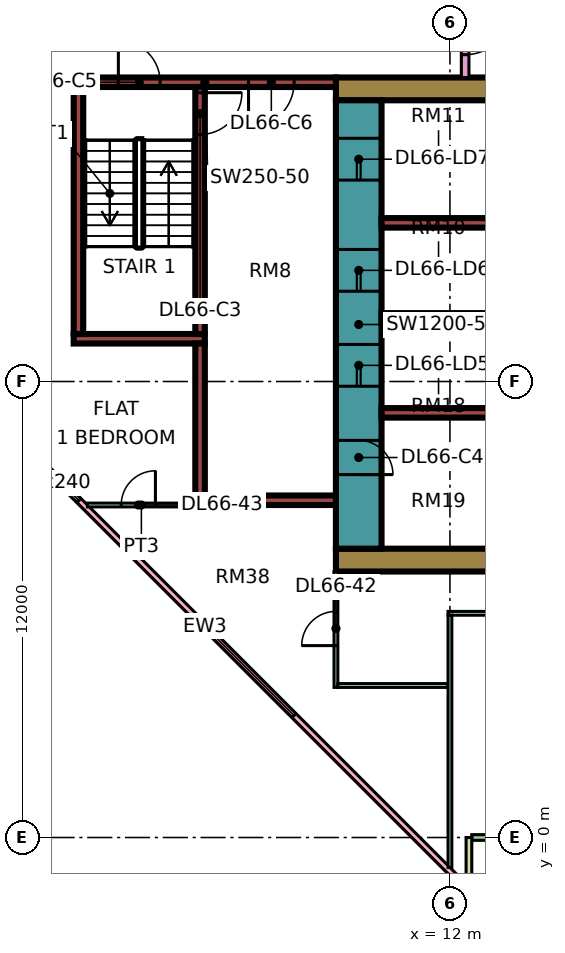
"""IFC4 building model, lengths in metres.
Left out: names, types, materials, properties, quantities, classifications, styles, units other than length and angle.
Written with IfcOpenShell. Run it as: python <this file> out.ifc"""

import sys

from ifc_helpers import new_model, si_unit, direction, frame, frame_2d, origin, place, context, subcontext, project, spatial, rectangle, extrude, element, fill, save


model = new_model("IFC4")
c1 = context("Model", 3, precision=1e-05, world=origin(), true_north=direction((0.0, 1.0)))
c2 = subcontext(c1, "Body", "Model", "MODEL_VIEW")
j1 = project(units=[si_unit("LENGTHUNIT", "METRE"), si_unit("PLANEANGLEUNIT", "RADIAN")], contexts=[c1])
p1 = place(None, origin())
s1 = spatial("IfcSite", under=j1, at=p1, CompositionType="ELEMENT")
p2 = place(p1, origin())
s2 = spatial("IfcBuilding", under=s1, at=p2, CompositionType="ELEMENT")
p3 = place(p2, frame((0.0, 0.0, 284.65)))
s3 = spatial("IfcBuildingStorey", under=s2, at=p3, CompositionType="ELEMENT", Elevation=284.65)
p4 = place(p3, frame((9.0, 7.3, 0.0), z_axis=(0.0, 0.0, 1.0), x_axis=(1.0, 0.0, 0.0)))
e1 = element("IfcWall", 1, at=p4, inside=s3, PredefinedType="SHEAR", context=c2, shape_type="SweptSolid", body=[
    extrude(rectangle(XDim=25.0, YDim=0.6, at=frame_2d((12.5, 0.0))), origin(), (0.0, 0.0, 1.0), 3.75),
])
p5 = place(p3, frame((9.0, 19.7, 0.0), z_axis=(0.0, 0.0, 1.0), x_axis=(1.0, 0.0, 0.0)))
e2 = element("IfcWall", 2, at=p5, inside=s3, PredefinedType="SHEAR", context=c2, shape_type="SweptSolid", body=[
    extrude(rectangle(XDim=25.0, YDim=0.6, at=frame_2d((12.5, 0.0))), origin(), (0.0, 0.0, 1.0), 3.75),
])
p6 = place(p5, frame((19.1, 0.0, 0.0)))
e3 = element("IfcOpeningElement", 3, at=p6, cuts=e2, PredefinedType="OPENING", context=c2, shape_type="SweptSolid", body=[
    extrude(rectangle(XDim=1.8, YDim=2.4, at=frame_2d((0.9, 1.2))), frame((0.0, 0.31, 0.0), z_axis=(0.0, -1.0, 0.0), x_axis=(1.0, 0.0, 0.0)), (0.0, 0.0, 1.0), 0.62),
])
p7 = place(p3, frame((9.6, 7.6, 0.0), z_axis=(0.0, 0.0, 1.0), x_axis=(0.0, 1.0, 0.0)))
e4 = element("IfcWall", 4, at=p7, inside=s3, PredefinedType="SHEAR", context=c2, shape_type="SweptSolid", body=[
    extrude(rectangle(XDim=11.8, YDim=1.2, at=frame_2d((5.9, 0.0))), origin(), (0.0, 0.0, 1.0), 3.75),
])
p8 = place(p7, frame((4.275, 0.0, 0.0)))
e5 = element("IfcOpeningElement", 5, at=p8, cuts=e4, PredefinedType="OPENING", context=c2, shape_type="SweptSolid", body=[
    extrude(rectangle(XDim=1.1, YDim=2.2, at=frame_2d((0.55, 1.1))), frame((0.0, 0.61, 0.0), z_axis=(0.0, -1.0, 0.0), x_axis=(1.0, 0.0, 0.0)), (0.0, 0.0, 1.0), 1.22),
])
p9 = place(p7, frame((6.775, 0.0, 0.0)))
e6 = element("IfcOpeningElement", 6, at=p9, cuts=e4, PredefinedType="OPENING", context=c2, shape_type="SweptSolid", body=[
    extrude(rectangle(XDim=1.1, YDim=2.2, at=frame_2d((0.55, 1.1))), frame((0.0, 0.61, 0.0), z_axis=(0.0, -1.0, 0.0), x_axis=(1.0, 0.0, 0.0)), (0.0, 0.0, 1.0), 1.22),
])
p10 = place(p7, frame((9.7, 0.0, 0.0)))
e7 = element("IfcOpeningElement", 7, at=p10, cuts=e4, PredefinedType="OPENING", context=c2, shape_type="SweptSolid", body=[
    extrude(rectangle(XDim=1.1, YDim=2.2, at=frame_2d((0.55, 1.1))), frame((0.0, 0.61, 0.0), z_axis=(0.0, -1.0, 0.0), x_axis=(1.0, 0.0, 0.0)), (0.0, 0.0, 1.0), 1.22),
])
p11 = place(p7, frame((1.95, 0.0, 0.0)))
e8 = element("IfcOpeningElement", 8, at=p11, cuts=e4, PredefinedType="OPENING", context=c2, shape_type="SweptSolid", body=[
    extrude(rectangle(XDim=0.9, YDim=2.1, at=frame_2d((0.45, 1.05))), frame((0.0, 0.61, 0.0), z_axis=(0.0, -1.0, 0.0), x_axis=(1.0, 0.0, 0.0)), (0.0, 0.0, 1.0), 1.22),
])
for number, where, z_axis, x_axis in (
    (9, (10.2, 11.175, 0.0), (0.0, 0.0, 1.0), (1.0, 0.0, 0.0)),
    (10, (10.2, 13.675, 0.0), (0.0, 0.0, 1.0), (1.0, 0.0, 0.0)),
    (11, (10.2, 16.175, 0.0), (0.0, 0.0, 1.0), (1.0, 0.0, 0.0)),
):
    element("IfcWall", number, at=place(p3, frame(where, z_axis=z_axis, x_axis=x_axis)), inside=s3, PredefinedType="SHEAR", context=c2, shape_type="SweptSolid", body=[
        extrude(rectangle(XDim=3.0, YDim=0.25, at=frame_2d((1.5, 0.0))), origin(), (0.0, 0.0, 1.0), 3.75),
    ])
p12 = place(p3, frame((2.1, 19.875, 0.0), z_axis=(0.0, 0.0, 1.0), x_axis=(1.0, 0.0, 0.0)))
e12 = element("IfcWall", 12, at=p12, inside=s3, PredefinedType="SHEAR", context=c2, shape_type="SweptSolid", body=[
    extrude(rectangle(XDim=6.9, YDim=0.25, at=frame_2d((3.45, 0.0))), origin(), (0.0, 0.0, 1.0), 3.75),
])
p13 = place(p12, frame((1.175, 0.0, 0.0)))
e13 = element("IfcOpeningElement", 13, at=p13, cuts=e12, PredefinedType="OPENING", context=c2, shape_type="SweptSolid", body=[
    extrude(rectangle(XDim=1.1, YDim=2.2, at=frame_2d((0.55, 1.1))), frame((0.0, 0.135, 0.0), z_axis=(0.0, -1.0, 0.0), x_axis=(1.0, 0.0, 0.0)), (0.0, 0.0, 1.0), 0.27),
])
p14 = place(p12, frame((4.6, 0.0, 0.0)))
e14 = element("IfcOpeningElement", 14, at=p14, cuts=e12, PredefinedType="OPENING", context=c2, shape_type="SweptSolid", body=[
    extrude(rectangle(XDim=1.2, YDim=2.2, at=frame_2d((0.6, 1.1))), frame((0.0, 0.135, 0.0), z_axis=(0.0, -1.0, 0.0), x_axis=(1.0, 0.0, 0.0)), (0.0, 0.0, 1.0), 0.27),
])
p15 = place(p3, frame((2.1, 13.125, 0.0), z_axis=(0.0, 0.0, 1.0), x_axis=(1.0, 0.0, 0.0)))
e15 = element("IfcWall", 15, at=p15, inside=s3, PredefinedType="SHEAR", context=c2, shape_type="SweptSolid", body=[
    extrude(rectangle(XDim=3.45, YDim=0.25, at=frame_2d((1.725, 0.0))), origin(), (0.0, 0.0, 1.0), 3.75),
])
p16 = place(p3, frame((2.225, 13.25, 0.0), z_axis=(0.0, 0.0, 1.0), x_axis=(0.0, 1.0, 0.0)))
e16 = element("IfcWall", 16, at=p16, inside=s3, PredefinedType="SHEAR", context=c2, shape_type="SweptSolid", body=[
    extrude(rectangle(XDim=6.5, YDim=0.25, at=frame_2d((3.25, 0.0))), origin(), (0.0, 0.0, 1.0), 3.75),
])
p17 = place(p3, frame((5.425, 13.25, 0.0), z_axis=(0.0, 0.0, 1.0), x_axis=(0.0, 1.0, 0.0)))
e17 = element("IfcWall", 17, at=p17, inside=s3, PredefinedType="SHEAR", context=c2, shape_type="SweptSolid", body=[
    extrude(rectangle(XDim=6.5, YDim=0.25, at=frame_2d((3.25, 0.0))), origin(), (0.0, 0.0, 1.0), 3.75),
])
p18 = place(p17, frame((5.25, 0.0, 0.0)))
e18 = element("IfcOpeningElement", 18, at=p18, cuts=e17, PredefinedType="OPENING", context=c2, shape_type="SweptSolid", body=[
    extrude(rectangle(XDim=1.1, YDim=2.2, at=frame_2d((0.55, 1.1))), frame((0.0, 0.135, 0.0), z_axis=(0.0, -1.0, 0.0), x_axis=(1.0, 0.0, 0.0)), (0.0, 0.0, 1.0), 0.27),
])
p19 = place(p3, frame((5.3, 8.875, 0.0), z_axis=(0.0, 0.0, 1.0), x_axis=(1.0, 0.0, 0.0)))
e19 = element("IfcWall", 19, at=p19, inside=s3, PredefinedType="SHEAR", context=c2, shape_type="SweptSolid", body=[
    extrude(rectangle(XDim=3.7, YDim=0.25, at=frame_2d((1.85, 0.0))), origin(), (0.0, 0.0, 1.0), 3.75),
])
p20 = place(p3, frame((5.425, 9.0, 0.0), z_axis=(0.0, 0.0, 1.0), x_axis=(0.0, 1.0, 0.0)))
e20 = element("IfcWall", 20, at=p20, inside=s3, PredefinedType="SHEAR", context=c2, shape_type="SweptSolid", body=[
    extrude(rectangle(XDim=4.0, YDim=0.25, at=frame_2d((2.0, 0.0))), origin(), (0.0, 0.0, 1.0), 3.75),
])
p21 = place(p3, frame((-1.447, 12.553, 0.0), z_axis=(0.0, 0.0, 1.0), x_axis=(0.707106781187, -0.707106781187, 0.0)))
e21 = element("IfcWall", 21, at=p21, inside=s3, PredefinedType="SOLIDWALL", context=c2, shape_type="SweptSolid", body=[
    extrude(rectangle(XDim=19.799, YDim=0.15, at=frame_2d((9.899, 0.0))), origin(), (0.0, 0.0, 1.0), 3.35),
])
p22 = place(p21, frame((2.212, 0.0, 0.45)))
e22 = element("IfcOpeningElement", 22, at=p22, cuts=e21, PredefinedType="OPENING", context=c2, shape_type="SweptSolid", body=[
    extrude(rectangle(XDim=3.0, YDim=2.4, at=frame_2d((1.5, 1.2))), frame((0.0, 0.085, 0.0), z_axis=(0.0, -1.0, 0.0), x_axis=(1.0, 0.0, 0.0)), (0.0, 0.0, 1.0), 0.17),
])
p23 = place(p21, frame((10.216, 0.0, 0.45)))
e23 = element("IfcOpeningElement", 23, at=p23, cuts=e21, PredefinedType="OPENING", context=c2, shape_type="SweptSolid", body=[
    extrude(rectangle(XDim=3.0, YDim=2.4, at=frame_2d((1.5, 1.2))), frame((0.0, 0.085, 0.0), z_axis=(0.0, -1.0, 0.0), x_axis=(1.0, 0.0, 0.0)), (0.0, 0.0, 1.0), 0.17),
])
p24 = place(p3, frame((12.575, 0.0, 0.0), z_axis=(0.0, 0.0, 1.0), x_axis=(1.0, 0.0, 0.0)))
e24 = element("IfcWall", 24, at=p24, inside=s3, PredefinedType="SOLIDWALL", context=c2, shape_type="SweptSolid", body=[
    extrude(rectangle(XDim=11.35, YDim=0.15, at=frame_2d((5.675, 0.0))), origin(), (0.0, 0.0, 1.0), 3.35),
])
p25 = place(p24, frame((3.312, 0.0, 0.0)))
e25 = element("IfcOpeningElement", 25, at=p25, cuts=e24, PredefinedType="OPENING", context=c2, shape_type="SweptSolid", body=[
    extrude(rectangle(XDim=1.8, YDim=2.4, at=frame_2d((0.9, 1.2))), frame((0.0, 0.085, 0.0), z_axis=(0.0, -1.0, 0.0), x_axis=(1.0, 0.0, 0.0)), (0.0, 0.0, 1.0), 0.17),
])
p26 = place(p24, frame((8.775, 0.0, 0.45)))
e26 = element("IfcOpeningElement", 26, at=p26, cuts=e24, PredefinedType="OPENING", context=c2, shape_type="SweptSolid", body=[
    extrude(rectangle(XDim=1.8, YDim=2.4, at=frame_2d((0.9, 1.2))), frame((0.0, 0.085, 0.0), z_axis=(0.0, -1.0, 0.0), x_axis=(1.0, 0.0, 0.0)), (0.0, 0.0, 1.0), 0.17),
])
p27 = place(p3, frame((12.5, -1.5, 0.0), z_axis=(0.0, 0.0, 1.0), x_axis=(0.0, 1.0, 0.0)))
e27 = element("IfcWall", 27, at=p27, inside=s3, PredefinedType="SOLIDWALL", context=c2, shape_type="SweptSolid", body=[
    extrude(rectangle(XDim=1.5, YDim=0.15, at=frame_2d((0.75, 0.0))), origin(), (0.0, 0.0, 1.0), 3.35),
])
p28 = place(p3, frame((0.074, 20.0, 0.0), z_axis=(0.0, 0.0, 1.0), x_axis=(1.0, 0.0, 0.0)))
e28 = element("IfcWall", 28, at=p28, inside=s3, PredefinedType="PARTITIONING", context=c2, shape_type="SweptSolid", body=[
    extrude(rectangle(XDim=2.026, YDim=0.2, at=frame_2d((1.013, 0.0))), origin(), (0.0, 0.0, 1.0), 3.35),
])
p29 = place(p3, frame((2.461, 8.75, 0.0), z_axis=(0.0, 0.0, 1.0), x_axis=(1.0, 0.0, 0.0)))
e29 = element("IfcWall", 29, at=p29, inside=s3, PredefinedType="PARTITIONING", context=c2, shape_type="SweptSolid", body=[
    extrude(rectangle(XDim=2.839, YDim=0.1, at=frame_2d((1.419, 0.0))), origin(), (0.0, 0.0, 1.0), 3.35),
])
p30 = place(p29, frame((0.889, 0.0, 0.0)))
e30 = element("IfcOpeningElement", 30, at=p30, cuts=e29, PredefinedType="OPENING", context=c2, shape_type="SweptSolid", body=[
    extrude(rectangle(XDim=0.9, YDim=2.1, at=frame_2d((0.45, 1.05))), frame((0.0, 0.06, 0.0), z_axis=(0.0, -1.0, 0.0), x_axis=(1.0, 0.0, 0.0)), (0.0, 0.0, 1.0), 0.12),
])
p31 = place(p3, frame((9.0, 3.95, 0.0), z_axis=(0.0, 0.0, 1.0), x_axis=(0.0, 1.0, 0.0)))
e31 = element("IfcWall", 31, at=p31, inside=s3, PredefinedType="PARTITIONING", context=c2, shape_type="SweptSolid", body=[
    extrude(rectangle(XDim=3.05, YDim=0.1, at=frame_2d((1.525, 0.0))), origin(), (0.0, 0.0, 1.0), 3.35),
])
p32 = place(p31, frame((1.1, 0.0, 0.0)))
e32 = element("IfcOpeningElement", 32, at=p32, cuts=e31, PredefinedType="OPENING", context=c2, shape_type="SweptSolid", body=[
    extrude(rectangle(XDim=0.9, YDim=2.1, at=frame_2d((0.45, 1.05))), frame((0.0, 0.06, 0.0), z_axis=(0.0, -1.0, 0.0), x_axis=(1.0, 0.0, 0.0)), (0.0, 0.0, 1.0), 0.12),
])
p33 = place(p3, frame((9.05, 4.0, 0.0), z_axis=(0.0, 0.0, 1.0), x_axis=(1.0, 0.0, 0.0)))
e33 = element("IfcWall", 33, at=p33, inside=s3, PredefinedType="PARTITIONING", context=c2, shape_type="SweptSolid", body=[
    extrude(rectangle(XDim=2.9, YDim=0.1, at=frame_2d((1.45, 0.0))), origin(), (0.0, 0.0, 1.0), 3.35),
])
p34 = place(p3, frame((11.95, 5.9, 0.0), z_axis=(0.0, 0.0, 1.0), x_axis=(1.0, 0.0, 0.0)))
e34 = element("IfcWall", 34, at=p34, inside=s3, PredefinedType="PARTITIONING", context=c2, shape_type="SweptSolid", body=[
    extrude(rectangle(XDim=21.1, YDim=0.1, at=frame_2d((10.55, 0.0))), origin(), (0.0, 0.0, 1.0), 3.35),
])
p35 = place(p34, frame((10.1, 0.0, 0.0)))
e35 = element("IfcOpeningElement", 35, at=p35, cuts=e34, PredefinedType="OPENING", context=c2, shape_type="SweptSolid", body=[
    extrude(rectangle(XDim=0.9, YDim=2.1, at=frame_2d((0.45, 1.05))), frame((0.0, 0.06, 0.0), z_axis=(0.0, -1.0, 0.0), x_axis=(1.0, 0.0, 0.0)), (0.0, 0.0, 1.0), 0.12),
])
p36 = place(p34, frame((13.1, 0.0, 0.0)))
e36 = element("IfcOpeningElement", 36, at=p36, cuts=e34, PredefinedType="OPENING", context=c2, shape_type="SweptSolid", body=[
    extrude(rectangle(XDim=0.9, YDim=2.1, at=frame_2d((0.45, 1.05))), frame((0.0, 0.06, 0.0), z_axis=(0.0, -1.0, 0.0), x_axis=(1.0, 0.0, 0.0)), (0.0, 0.0, 1.0), 0.12),
])
p37 = place(p34, frame((16.1, 0.0, 0.0)))
e37 = element("IfcOpeningElement", 37, at=p37, cuts=e34, PredefinedType="OPENING", context=c2, shape_type="SweptSolid", body=[
    extrude(rectangle(XDim=0.9, YDim=2.1, at=frame_2d((0.45, 1.05))), frame((0.0, 0.06, 0.0), z_axis=(0.0, -1.0, 0.0), x_axis=(1.0, 0.0, 0.0)), (0.0, 0.0, 1.0), 0.12),
])
p38 = place(p34, frame((4.1, 0.0, 0.0)))
e38 = element("IfcOpeningElement", 38, at=p38, cuts=e34, PredefinedType="OPENING", context=c2, shape_type="SweptSolid", body=[
    extrude(rectangle(XDim=0.9, YDim=2.1, at=frame_2d((0.45, 1.05))), frame((0.0, 0.06, 0.0), z_axis=(0.0, -1.0, 0.0), x_axis=(1.0, 0.0, 0.0)), (0.0, 0.0, 1.0), 0.12),
])
p39 = place(p3, frame((12.0, -0.788, 0.0), z_axis=(0.0, 0.0, 1.0), x_axis=(0.0, 1.0, 0.0)))
e39 = element("IfcWall", 39, at=p39, inside=s3, PredefinedType="PARTITIONING", context=c2, shape_type="SweptSolid", body=[
    extrude(rectangle(XDim=6.638, YDim=0.1, at=frame_2d((3.319, 0.0))), origin(), (0.0, 0.0, 1.0), 3.35),
])
p40 = place(p3, frame((12.4, 20.0, 0.0), z_axis=(0.0, 0.0, 1.0), x_axis=(0.0, 1.0, 0.0)))
e40 = element("IfcWall", 40, at=p40, inside=s3, PredefinedType="PARTITIONING", context=c2, shape_type="SweptSolid", body=[
    extrude(rectangle(XDim=33.926, YDim=0.2, at=frame_2d((16.963, 0.0))), origin(), (0.0, 0.0, 1.0), 3.35),
])
p41 = place(p40, frame((25.8, 0.0, 0.0)))
e41 = element("IfcOpeningElement", 41, at=p41, cuts=e40, PredefinedType="OPENING", context=c2, shape_type="SweptSolid", body=[
    extrude(rectangle(XDim=1.0, YDim=2.1, at=frame_2d((0.5, 1.05))), frame((0.0, 0.11, 0.0), z_axis=(0.0, -1.0, 0.0), x_axis=(1.0, 0.0, 0.0)), (0.0, 0.0, 1.0), 0.22),
])
p42 = place(p40, frame((0.6, 0.0, 0.0)))
e42 = element("IfcOpeningElement", 42, at=p42, cuts=e40, PredefinedType="OPENING", context=c2, shape_type="SweptSolid", body=[
    extrude(rectangle(XDim=1.2, YDim=2.1, at=frame_2d((0.6, 1.05))), frame((0.0, 0.11, 0.0), z_axis=(0.0, -1.0, 0.0), x_axis=(1.0, 0.0, 0.0)), (0.0, 0.0, 1.0), 0.22),
])
p43 = place(p40, frame((4.5, 0.0, 0.0)))
e43 = element("IfcOpeningElement", 43, at=p43, cuts=e40, PredefinedType="OPENING", context=c2, shape_type="SweptSolid", body=[
    extrude(rectangle(XDim=1.0, YDim=2.1, at=frame_2d((0.5, 1.05))), frame((0.0, 0.11, 0.0), z_axis=(0.0, -1.0, 0.0), x_axis=(1.0, 0.0, 0.0)), (0.0, 0.0, 1.0), 0.22),
])
p44 = place(p22, origin())
e44 = element("IfcWindow", 44, at=p44, inside=s3, PartitioningType="SINGLE_PANEL", PredefinedType="WINDOW", context=c2, shape_type="SweptSolid", body=[
    extrude(rectangle(XDim=3.0, YDim=2.4, at=frame_2d((1.5, 1.2))), frame((0.0, 0.03, 0.0), z_axis=(0.0, -1.0, 0.0), x_axis=(1.0, 0.0, 0.0)), (0.0, 0.0, 1.0), 0.06),
])
fill(e22, e44)
p45 = place(p23, origin())
e45 = element("IfcWindow", 45, at=p45, inside=s3, PartitioningType="SINGLE_PANEL", PredefinedType="WINDOW", context=c2, shape_type="SweptSolid", body=[
    extrude(rectangle(XDim=3.0, YDim=2.4, at=frame_2d((1.5, 1.2))), frame((0.0, 0.03, 0.0), z_axis=(0.0, -1.0, 0.0), x_axis=(1.0, 0.0, 0.0)), (0.0, 0.0, 1.0), 0.06),
])
fill(e23, e45)
p46 = place(p8, origin())
e46 = element("IfcDoor", 46, at=p46, inside=s3, OperationType="DOUBLE_DOOR_SLIDING", PredefinedType="DOOR", context=c2, shape_type="SweptSolid", body=[
    extrude(rectangle(XDim=1.1, YDim=2.2, at=frame_2d((0.55, 1.1))), frame((0.0, 0.025, 0.0), z_axis=(0.0, -1.0, 0.0), x_axis=(1.0, 0.0, 0.0)), (0.0, 0.0, 1.0), 0.05),
])
fill(e5, e46)
p47 = place(p9, origin())
e47 = element("IfcDoor", 47, at=p47, inside=s3, OperationType="DOUBLE_DOOR_SLIDING", PredefinedType="DOOR", context=c2, shape_type="SweptSolid", body=[
    extrude(rectangle(XDim=1.1, YDim=2.2, at=frame_2d((0.55, 1.1))), frame((0.0, 0.025, 0.0), z_axis=(0.0, -1.0, 0.0), x_axis=(1.0, 0.0, 0.0)), (0.0, 0.0, 1.0), 0.05),
])
fill(e6, e47)
p48 = place(p10, origin())
e48 = element("IfcDoor", 48, at=p48, inside=s3, OperationType="DOUBLE_DOOR_SLIDING", PredefinedType="DOOR", context=c2, shape_type="SweptSolid", body=[
    extrude(rectangle(XDim=1.1, YDim=2.2, at=frame_2d((0.55, 1.1))), frame((0.0, 0.025, 0.0), z_axis=(0.0, -1.0, 0.0), x_axis=(1.0, 0.0, 0.0)), (0.0, 0.0, 1.0), 0.05),
])
fill(e7, e48)
p49 = place(p18, origin())
e49 = element("IfcDoor", 49, at=p49, inside=s3, OperationType="SINGLE_SWING_RIGHT", PredefinedType="DOOR", context=c2, shape_type="SweptSolid", body=[
    extrude(rectangle(XDim=1.1, YDim=2.2, at=frame_2d((0.55, 1.1))), frame((0.0, 0.025, 0.0), z_axis=(0.0, -1.0, 0.0), x_axis=(1.0, 0.0, 0.0)), (0.0, 0.0, 1.0), 0.05),
])
fill(e18, e49)
p50 = place(p11, frame((0.9, 0.0, 0.0), z_axis=(0.0, 0.0, 1.0), x_axis=(-1.0, 0.0, 0.0)))
e50 = element("IfcDoor", 50, at=p50, inside=s3, OperationType="SINGLE_SWING_LEFT", PredefinedType="DOOR", context=c2, shape_type="SweptSolid", body=[
    extrude(rectangle(XDim=0.9, YDim=2.1, at=frame_2d((0.45, 1.05))), frame((0.0, 0.025, 0.0), z_axis=(0.0, -1.0, 0.0), x_axis=(1.0, 0.0, 0.0)), (0.0, 0.0, 1.0), 0.05),
])
fill(e8, e50)
p51 = place(p13, origin())
e51 = element("IfcDoor", 51, at=p51, inside=s3, OperationType="SINGLE_SWING_LEFT", PredefinedType="DOOR", context=c2, shape_type="SweptSolid", body=[
    extrude(rectangle(XDim=1.1, YDim=2.2, at=frame_2d((0.55, 1.1))), frame((0.0, 0.025, 0.0), z_axis=(0.0, -1.0, 0.0), x_axis=(1.0, 0.0, 0.0)), (0.0, 0.0, 1.0), 0.05),
])
fill(e13, e51)
p52 = place(p14, frame((1.2, 0.0, 0.0), z_axis=(0.0, 0.0, 1.0), x_axis=(-1.0, 0.0, 0.0)))
e52 = element("IfcDoor", 52, at=p52, inside=s3, OperationType="SINGLE_SWING_LEFT", PredefinedType="DOOR", context=c2, shape_type="SweptSolid", body=[
    extrude(rectangle(XDim=1.2, YDim=2.2, at=frame_2d((0.6, 1.1))), frame((0.0, 0.025, 0.0), z_axis=(0.0, -1.0, 0.0), x_axis=(1.0, 0.0, 0.0)), (0.0, 0.0, 1.0), 0.05),
])
fill(e14, e52)
p53 = place(p42, origin())
e53 = element("IfcDoor", 53, at=p53, inside=s3, OperationType="SINGLE_SWING_RIGHT", PredefinedType="DOOR", context=c2, shape_type="SweptSolid", body=[
    extrude(rectangle(XDim=1.2, YDim=2.1, at=frame_2d((0.6, 1.05))), frame((0.0, 0.025, 0.0), z_axis=(0.0, -1.0, 0.0), x_axis=(1.0, 0.0, 0.0)), (0.0, 0.0, 1.0), 0.05),
])
fill(e42, e53)
p54 = place(p32, origin())
e54 = element("IfcDoor", 54, at=p54, inside=s3, OperationType="SINGLE_SWING_LEFT", PredefinedType="DOOR", context=c2, shape_type="SweptSolid", body=[
    extrude(rectangle(XDim=0.9, YDim=2.1, at=frame_2d((0.45, 1.05))), frame((0.0, 0.025, 0.0), z_axis=(0.0, -1.0, 0.0), x_axis=(1.0, 0.0, 0.0)), (0.0, 0.0, 1.0), 0.05),
])
fill(e32, e54)
p55 = place(p30, frame((0.9, 0.0, 0.0), z_axis=(0.0, 0.0, 1.0), x_axis=(-1.0, 0.0, 0.0)))
e55 = element("IfcDoor", 55, at=p55, inside=s3, OperationType="SINGLE_SWING_RIGHT", PredefinedType="DOOR", context=c2, shape_type="SweptSolid", body=[
    extrude(rectangle(XDim=0.9, YDim=2.1, at=frame_2d((0.45, 1.05))), frame((0.0, 0.025, 0.0), z_axis=(0.0, -1.0, 0.0), x_axis=(1.0, 0.0, 0.0)), (0.0, 0.0, 1.0), 0.05),
])
fill(e30, e55)
save(model, sys.argv[1])
